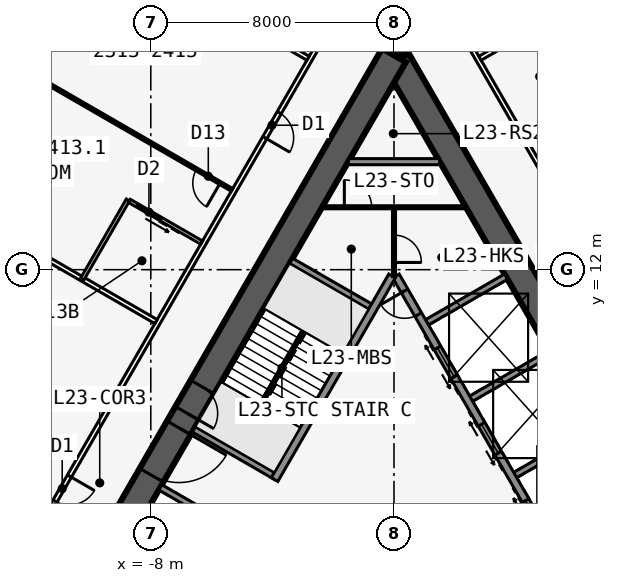
"""IFC4 building model, lengths in metres.
Left out: names, types, materials, properties, quantities, classifications, styles, units other than length and angle.
Written with IfcOpenShell. Run it as: python <this file> out.ifc"""

import sys

from ifc_helpers import new_model, si_unit, direction, frame, frame_2d, origin, place, context, subcontext, project, spatial, rectangle, extrude, element, fill, save


model = new_model("IFC4")
c1 = context("Model", 3, precision=1e-05, world=origin(), true_north=direction((0.0, 1.0)))
c2 = subcontext(c1, "Body", "Model", "MODEL_VIEW")
j1 = project(units=[si_unit("LENGTHUNIT", "METRE"), si_unit("PLANEANGLEUNIT", "RADIAN")], contexts=[c1])
p1 = place(None, origin())
s1 = spatial("IfcSite", under=j1, at=p1, CompositionType="ELEMENT")
p2 = place(p1, origin())
s2 = spatial("IfcBuilding", under=s1, at=p2, CompositionType="ELEMENT")
p3 = place(p2, frame((0.0, 0.0, 89.7)))
s3 = spatial("IfcBuildingStorey", under=s2, at=p3, CompositionType="ELEMENT", Elevation=89.7)
p4 = place(p3, frame((16.5, -9.526, 0.0), z_axis=(0.0, 0.0, 1.0), x_axis=(-0.499999749417, 0.866025548458, 0.0)))
e1 = element("IfcWall", 1, at=p4, inside=s3, PredefinedType="SHEAR", context=c2, shape_type="SweptSolid", body=[
    extrude(rectangle(XDim=33.0, YDim=0.9, at=frame_2d((16.5, 0.0))), origin(), (0.0, 0.0, 1.0), 3.4),
])
p5 = place(p4, frame((14.15, 0.0, 0.0)))
e2 = element("IfcOpeningElement", 2, at=p5, cuts=e1, PredefinedType="OPENING", context=c2, shape_type="SweptSolid", body=[
    extrude(rectangle(XDim=1.8, YDim=2.13, at=frame_2d((0.9, 1.065))), frame((0.0, 0.46, 0.0), z_axis=(0.0, -1.0, 0.0), x_axis=(1.0, 0.0, 0.0)), (0.0, 0.0, 1.0), 0.92),
])
p6 = place(p4, frame((12.6, 0.0, 0.0)))
e3 = element("IfcOpeningElement", 3, at=p6, cuts=e1, PredefinedType="OPENING", context=c2, shape_type="SweptSolid", body=[
    extrude(rectangle(XDim=1.0, YDim=2.13, at=frame_2d((0.5, 1.065))), frame((0.0, 0.46, 0.0), z_axis=(0.0, -1.0, 0.0), x_axis=(1.0, 0.0, 0.0)), (0.0, 0.0, 1.0), 0.92),
])
p7 = place(p3, frame((5.379, 2.586, 0.0), z_axis=(0.0, 0.0, 1.0), x_axis=(-0.500001375892, 0.866024609411, 0.0)))
e4 = element("IfcWall", 4, at=p7, inside=s3, PredefinedType="SOLIDWALL", context=c2, shape_type="SweptSolid", body=[
    extrude(rectangle(XDim=10.633, YDim=0.25, at=frame_2d((5.316, 0.0))), origin(), (0.0, 0.0, 1.0), 3.235),
])
p8 = place(p7, frame((9.164, 0.0, 0.0)))
e5 = element("IfcOpeningElement", 5, at=p8, cuts=e4, PredefinedType="OPENING", context=c2, shape_type="SweptSolid", body=[
    extrude(rectangle(XDim=0.9, YDim=2.13, at=frame_2d((0.45, 1.065))), frame((0.0, 0.135, 0.0), z_axis=(0.0, -1.0, 0.0), x_axis=(1.0, 0.0, 0.0)), (0.0, 0.0, 1.0), 0.27),
])
p9 = place(p7, frame((1.0, 0.0, 0.0)))
e6 = element("IfcOpeningElement", 6, at=p9, cuts=e4, PredefinedType="OPENING", context=c2, shape_type="SweptSolid", body=[
    extrude(rectangle(XDim=1.1, YDim=2.13, at=frame_2d((0.55, 1.065))), frame((0.0, 0.135, 0.0), z_axis=(0.0, -1.0, 0.0), x_axis=(1.0, 0.0, 0.0)), (0.0, 0.0, 1.0), 0.27),
])
p10 = place(p7, frame((3.9, 0.0, 0.0)))
e7 = element("IfcOpeningElement", 7, at=p10, cuts=e4, PredefinedType="OPENING", context=c2, shape_type="SweptSolid", body=[
    extrude(rectangle(XDim=1.1, YDim=2.13, at=frame_2d((0.55, 1.065))), frame((0.0, 0.135, 0.0), z_axis=(0.0, -1.0, 0.0), x_axis=(1.0, 0.0, 0.0)), (0.0, 0.0, 1.0), 0.27),
])
p11 = place(p7, frame((6.8, 0.0, 0.0)))
e8 = element("IfcOpeningElement", 8, at=p11, cuts=e4, PredefinedType="OPENING", context=c2, shape_type="SweptSolid", body=[
    extrude(rectangle(XDim=1.1, YDim=2.13, at=frame_2d((0.55, 1.065))), frame((0.0, 0.135, 0.0), z_axis=(0.0, -1.0, 0.0), x_axis=(1.0, 0.0, 0.0)), (0.0, 0.0, 1.0), 0.27),
])
for number, where, z_axis, x_axis in (
    (9, (3.879, 5.184, 0.0), (0.0, 0.0, 1.0), (0.866, 0.5, 0.0)),
    (10, (2.429, 7.696, 0.0), (0.0, 0.0, 1.0), (0.866, 0.5, 0.0)),
    (11, (0.979, 10.207, 0.0), (0.0, 0.0, 1.0), (0.866, 0.5, 0.0)),
):
    element("IfcWall", number, at=place(p3, frame(where, z_axis=z_axis, x_axis=x_axis)), inside=s3, PredefinedType="SOLIDWALL", context=c2, shape_type="SweptSolid", body=[
        extrude(rectangle(XDim=3.125, YDim=0.2, at=frame_2d((1.562, 0.0))), origin(), (0.0, 0.0, 1.0), 3.235),
    ])
p12 = place(p3, frame((0.0, 19.052, 0.0), z_axis=(0.0, 0.0, 1.0), x_axis=(-0.499999749417, -0.866025548458, 0.0)))
e12 = element("IfcWall", 12, at=p12, inside=s3, PredefinedType="SHEAR", context=c2, shape_type="SweptSolid", body=[
    extrude(rectangle(XDim=33.0, YDim=0.9, at=frame_2d((16.5, 0.0))), origin(), (0.0, 0.0, 1.0), 3.4),
])
p13 = place(p12, frame((14.15, 0.0, 0.0)))
e13 = element("IfcOpeningElement", 13, at=p13, cuts=e12, PredefinedType="OPENING", context=c2, shape_type="SweptSolid", body=[
    extrude(rectangle(XDim=1.8, YDim=2.13, at=frame_2d((0.9, 1.065))), frame((0.0, 0.46, 0.0), z_axis=(0.0, -1.0, 0.0), x_axis=(1.0, 0.0, 0.0)), (0.0, 0.0, 1.0), 0.92),
])
p14 = place(p12, frame((12.6, 0.0, 0.0)))
e14 = element("IfcOpeningElement", 14, at=p14, cuts=e12, PredefinedType="OPENING", context=c2, shape_type="SweptSolid", body=[
    extrude(rectangle(XDim=1.0, YDim=2.13, at=frame_2d((0.5, 1.065))), frame((0.0, 0.46, 0.0), z_axis=(0.0, -1.0, 0.0), x_axis=(1.0, 0.0, 0.0)), (0.0, 0.0, 1.0), 0.92),
])
p15 = place(p3, frame((-0.062, 11.794, 0.0), z_axis=(0.0, 0.0, 1.0), x_axis=(-0.500006680225, -0.86602154692, 0.0)))
e15 = element("IfcWall", 15, at=p15, inside=s3, PredefinedType="SOLIDWALL", context=c2, shape_type="SweptSolid", body=[
    extrude(rectangle(XDim=7.733, YDim=0.25, at=frame_2d((3.866, 0.0))), origin(), (0.0, 0.0, 1.0), 3.235),
])
for number, where, z_axis, x_axis in (
    (16, (-0.679, 10.727, 0.0), (0.0, 0.0, 1.0), (-0.866, 0.5, 0.0)),
    (17, (-3.879, 5.184, 0.0), (0.0, 0.0, 1.0), (-0.866, 0.5, 0.0)),
    (18, (-4.979, 3.279, 0.0), (0.0, 0.0, 1.0), (-0.866, 0.5, 0.0)),
):
    element("IfcWall", number, at=place(p3, frame(where, z_axis=z_axis, x_axis=x_axis)), inside=s3, PredefinedType="SOLIDWALL", context=c2, shape_type="SweptSolid", body=[
        extrude(rectangle(XDim=3.125, YDim=0.2, at=frame_2d((1.562, 0.0))), origin(), (0.0, 0.0, 1.0), 3.235),
    ])
p16 = place(p3, frame((0.0, 19.052, 0.0), z_axis=(0.0, 0.0, 1.0), x_axis=(0.0, 1.0, 0.0)))
e19 = element("IfcWall", 19, at=p16, inside=s3, PredefinedType="SHEAR", context=c2, shape_type="SweptSolid", body=[
    extrude(rectangle(XDim=4.746, YDim=0.9, at=frame_2d((2.373, 0.0))), origin(), (0.0, 0.0, 1.0), 3.4),
])
p17 = place(p16, frame((1.8, 0.0, 0.0)))
e20 = element("IfcOpeningElement", 20, at=p17, cuts=e19, PredefinedType="OPENING", context=c2, shape_type="SweptSolid", body=[
    extrude(rectangle(XDim=1.8, YDim=2.13, at=frame_2d((0.9, 1.065))), frame((0.0, 0.46, 0.0), z_axis=(0.0, -1.0, 0.0), x_axis=(1.0, 0.0, 0.0)), (0.0, 0.0, 1.0), 0.92),
])
p18 = place(p3, frame((20.027, -10.985, 0.0), z_axis=(0.0, 0.0, 1.0), x_axis=(-0.500001677587, 0.866024435227, 0.0)))
e21 = element("IfcWall", 21, at=p18, inside=s3, PredefinedType="PARTITIONING", context=c2, shape_type="SweptSolid", body=[
    extrude(rectangle(XDim=39.054, YDim=0.15, at=frame_2d((19.527, 0.0))), origin(), (0.0, 0.0, 1.0), 3.235),
])
p19 = place(p18, frame((0.352, 0.0, 0.0)))
e22 = element("IfcOpeningElement", 22, at=p19, cuts=e21, PredefinedType="OPENING", context=c2, shape_type="SweptSolid", body=[
    extrude(rectangle(XDim=0.95, YDim=2.13, at=frame_2d((0.475, 1.065))), frame((0.0, 0.085, 0.0), z_axis=(0.0, -1.0, 0.0), x_axis=(1.0, 0.0, 0.0)), (0.0, 0.0, 1.0), 0.17),
])
p20 = place(p18, frame((10.352, 0.0, 0.0)))
e23 = element("IfcOpeningElement", 23, at=p20, cuts=e21, PredefinedType="OPENING", context=c2, shape_type="SweptSolid", body=[
    extrude(rectangle(XDim=0.95, YDim=2.13, at=frame_2d((0.475, 1.065))), frame((0.0, 0.085, 0.0), z_axis=(0.0, -1.0, 0.0), x_axis=(1.0, 0.0, 0.0)), (0.0, 0.0, 1.0), 0.17),
])
p21 = place(p18, frame((17.752, 0.0, 0.0)))
e24 = element("IfcOpeningElement", 24, at=p21, cuts=e21, PredefinedType="OPENING", context=c2, shape_type="SweptSolid", body=[
    extrude(rectangle(XDim=0.95, YDim=2.13, at=frame_2d((0.475, 1.065))), frame((0.0, 0.085, 0.0), z_axis=(0.0, -1.0, 0.0), x_axis=(1.0, 0.0, 0.0)), (0.0, 0.0, 1.0), 0.17),
])
p22 = place(p18, frame((26.552, 0.0, 0.0)))
e25 = element("IfcOpeningElement", 25, at=p22, cuts=e21, PredefinedType="OPENING", context=c2, shape_type="SweptSolid", body=[
    extrude(rectangle(XDim=0.95, YDim=2.13, at=frame_2d((0.475, 1.065))), frame((0.0, 0.085, 0.0), z_axis=(0.0, -1.0, 0.0), x_axis=(1.0, 0.0, 0.0)), (0.0, 0.0, 1.0), 0.17),
])
p23 = place(p18, frame((37.752, 0.0, 0.0)))
e26 = element("IfcOpeningElement", 26, at=p23, cuts=e21, PredefinedType="OPENING", context=c2, shape_type="SweptSolid", body=[
    extrude(rectangle(XDim=0.95, YDim=2.13, at=frame_2d((0.475, 1.065))), frame((0.0, 0.085, 0.0), z_axis=(0.0, -1.0, 0.0), x_axis=(1.0, 0.0, 0.0)), (0.0, 0.0, 1.0), 0.17),
])
p24 = place(p3, frame((2.829, 18.954, 0.0), z_axis=(0.0, 0.0, 1.0), x_axis=(0.866020536561, 0.500008430184, 0.0)))
e27 = element("IfcWall", 27, at=p24, inside=s3, PredefinedType="PARTITIONING", context=c2, shape_type="SweptSolid", body=[
    extrude(rectangle(XDim=8.72, YDim=0.15, at=frame_2d((4.36, 0.0))), origin(), (0.0, 0.0, 1.0), 2.389),
])
p25 = place(p3, frame((4.329, 16.355, 0.0), z_axis=(0.0, 0.0, 1.0), x_axis=(0.866035715982, 0.499982138324, 0.0)))
e28 = element("IfcWall", 28, at=p25, inside=s3, PredefinedType="PLUMBINGWALL", context=c2, shape_type="SweptSolid", body=[
    extrude(rectangle(XDim=2.74, YDim=0.12, at=frame_2d((1.37, 0.0))), origin(), (0.0, 0.0, 1.0), 3.235),
])
p26 = place(p25, frame((1.55, 0.0, 0.0)))
e29 = element("IfcOpeningElement", 29, at=p26, cuts=e28, PredefinedType="OPENING", context=c2, shape_type="SweptSolid", body=[
    extrude(rectangle(XDim=0.9, YDim=2.13, at=frame_2d((0.45, 1.065))), frame((0.0, 0.07, 0.0), z_axis=(0.0, -1.0, 0.0), x_axis=(1.0, 0.0, 0.0)), (0.0, 0.0, 1.0), 0.14),
])
p27 = place(p3, frame((-0.5, 22.836, 0.0), z_axis=(0.0, 0.0, 1.0), x_axis=(-0.500001677587, -0.866024435227, 0.0)))
e30 = element("IfcWall", 30, at=p27, inside=s3, PredefinedType="PARTITIONING", context=c2, shape_type="SweptSolid", body=[
    extrude(rectangle(XDim=39.054, YDim=0.15, at=frame_2d((19.527, 0.0))), origin(), (0.0, 0.0, 1.0), 3.235),
])
p28 = place(p27, frame((0.352, 0.0, 0.0)))
e31 = element("IfcOpeningElement", 31, at=p28, cuts=e30, PredefinedType="OPENING", context=c2, shape_type="SweptSolid", body=[
    extrude(rectangle(XDim=0.95, YDim=2.13, at=frame_2d((0.475, 1.065))), frame((0.0, 0.085, 0.0), z_axis=(0.0, -1.0, 0.0), x_axis=(1.0, 0.0, 0.0)), (0.0, 0.0, 1.0), 0.17),
])
p29 = place(p27, frame((6.552, 0.0, 0.0)))
e32 = element("IfcOpeningElement", 32, at=p29, cuts=e30, PredefinedType="OPENING", context=c2, shape_type="SweptSolid", body=[
    extrude(rectangle(XDim=0.95, YDim=2.13, at=frame_2d((0.475, 1.065))), frame((0.0, 0.085, 0.0), z_axis=(0.0, -1.0, 0.0), x_axis=(1.0, 0.0, 0.0)), (0.0, 0.0, 1.0), 0.17),
])
p30 = place(p27, frame((20.352, 0.0, 0.0)))
e33 = element("IfcOpeningElement", 33, at=p30, cuts=e30, PredefinedType="OPENING", context=c2, shape_type="SweptSolid", body=[
    extrude(rectangle(XDim=0.95, YDim=2.13, at=frame_2d((0.475, 1.065))), frame((0.0, 0.085, 0.0), z_axis=(0.0, -1.0, 0.0), x_axis=(1.0, 0.0, 0.0)), (0.0, 0.0, 1.0), 0.17),
])
p31 = place(p27, frame((27.752, 0.0, 0.0)))
e34 = element("IfcOpeningElement", 34, at=p31, cuts=e30, PredefinedType="OPENING", context=c2, shape_type="SweptSolid", body=[
    extrude(rectangle(XDim=0.95, YDim=2.13, at=frame_2d((0.475, 1.065))), frame((0.0, 0.085, 0.0), z_axis=(0.0, -1.0, 0.0), x_axis=(1.0, 0.0, 0.0)), (0.0, 0.0, 1.0), 0.17),
])
p32 = place(p27, frame((37.752, 0.0, 0.0)))
e35 = element("IfcOpeningElement", 35, at=p32, cuts=e30, PredefinedType="OPENING", context=c2, shape_type="SweptSolid", body=[
    extrude(rectangle(XDim=0.95, YDim=2.13, at=frame_2d((0.475, 1.065))), frame((0.0, 0.085, 0.0), z_axis=(0.0, -1.0, 0.0), x_axis=(1.0, 0.0, 0.0)), (0.0, 0.0, 1.0), 0.17),
])
p33 = place(p3, frame((-2.829, 18.954, 0.0), z_axis=(0.0, 0.0, 1.0), x_axis=(-0.866020536561, 0.500008430184, 0.0)))
e36 = element("IfcWall", 36, at=p33, inside=s3, PredefinedType="PARTITIONING", context=c2, shape_type="SweptSolid", body=[
    extrude(rectangle(XDim=8.72, YDim=0.15, at=frame_2d((4.36, 0.0))), origin(), (0.0, 0.0, 1.0), 2.389),
])
p34 = place(p3, frame((-5.329, 14.623, 0.0), z_axis=(0.0, 0.0, 1.0), x_axis=(-0.866018409083, 0.500012114982, 0.0)))
e37 = element("IfcWall", 37, at=p34, inside=s3, PredefinedType="PARTITIONING", context=c2, shape_type="SweptSolid", body=[
    extrude(rectangle(XDim=9.485, YDim=0.1, at=frame_2d((4.742, 0.0))), origin(), (0.0, 0.0, 1.0), 2.389),
])
p35 = place(p34, frame((0.45, 0.0, 0.0)))
e38 = element("IfcOpeningElement", 38, at=p35, cuts=e37, PredefinedType="OPENING", context=c2, shape_type="SweptSolid", body=[
    extrude(rectangle(XDim=0.9, YDim=2.13, at=frame_2d((0.45, 1.065))), frame((0.0, 0.06, 0.0), z_axis=(0.0, -1.0, 0.0), x_axis=(1.0, 0.0, 0.0)), (0.0, 0.0, 1.0), 0.12),
])
p36 = place(p3, frame((-7.829, 10.293, 0.0), z_axis=(0.0, 0.0, 1.0), x_axis=(-0.866016302457, 0.50001576363, 0.0)))
e39 = element("IfcWall", 39, at=p36, inside=s3, PredefinedType="PARTITIONING", context=c2, shape_type="SweptSolid", body=[
    extrude(rectangle(XDim=9.943, YDim=0.15, at=frame_2d((4.972, 0.0))), origin(), (0.0, 0.0, 1.0), 2.389),
])
p37 = place(p3, frame((-8.753, 14.291, 0.0), z_axis=(0.0, 0.0, 1.0), x_axis=(-0.50002537861, -0.866010750942, 0.0)))
e40 = element("IfcWall", 40, at=p37, inside=s3, PredefinedType="PLUMBINGWALL", context=c2, shape_type="SweptSolid", body=[
    extrude(rectangle(XDim=3.0, YDim=0.12, at=frame_2d((1.5, 0.0))), origin(), (0.0, 0.0, 1.0), 3.235),
])
p38 = place(p3, frame((-6.329, 12.891, 0.0), z_axis=(0.0, 0.0, 1.0), x_axis=(-0.866035715982, 0.499982138324, 0.0)))
e41 = element("IfcWall", 41, at=p38, inside=s3, PredefinedType="PLUMBINGWALL", context=c2, shape_type="SweptSolid", body=[
    extrude(rectangle(XDim=2.74, YDim=0.12, at=frame_2d((1.37, 0.0))), origin(), (0.0, 0.0, 1.0), 3.235),
])
p39 = place(p38, frame((1.55, 0.0, 0.0)))
e42 = element("IfcOpeningElement", 42, at=p39, cuts=e41, PredefinedType="OPENING", context=c2, shape_type="SweptSolid", body=[
    extrude(rectangle(XDim=0.9, YDim=2.13, at=frame_2d((0.45, 1.065))), frame((0.0, 0.07, 0.0), z_axis=(0.0, -1.0, 0.0), x_axis=(1.0, 0.0, 0.0)), (0.0, 0.0, 1.0), 0.14),
])
p40 = place(p3, frame((-1.501, 15.552, 0.0), z_axis=(0.0, 0.0, 1.0), x_axis=(1.0, 0.0, 0.0)))
e43 = element("IfcWall", 43, at=p40, inside=s3, PredefinedType="SOLIDWALL", context=c2, shape_type="SweptSolid", body=[
    extrude(rectangle(XDim=3.002, YDim=0.2, at=frame_2d((1.501, 0.0))), origin(), (0.0, 0.0, 1.0), 3.235),
])
p41 = place(p3, frame((-2.367, 14.052, 0.0), z_axis=(0.0, 0.0, 1.0), x_axis=(1.0, 0.0, 0.0)))
e44 = element("IfcWall", 44, at=p41, inside=s3, PredefinedType="PARTITIONING", context=c2, shape_type="SweptSolid", body=[
    extrude(rectangle(XDim=4.734, YDim=0.1, at=frame_2d((2.367, 0.0))), origin(), (0.0, 0.0, 1.0), 3.235),
])
p42 = place(p41, frame((0.734, 0.0, 0.0)))
e45 = element("IfcOpeningElement", 45, at=p42, cuts=e44, PredefinedType="OPENING", context=c2, shape_type="SweptSolid", body=[
    extrude(rectangle(XDim=0.9, YDim=2.13, at=frame_2d((0.45, 1.065))), frame((0.0, 0.06, 0.0), z_axis=(0.0, -1.0, 0.0), x_axis=(1.0, 0.0, 0.0)), (0.0, 0.0, 1.0), 0.12),
])
p43 = place(p3, frame((0.0, 14.052, 0.0), z_axis=(0.0, 0.0, 1.0), x_axis=(0.0, -1.0, 0.0)))
e46 = element("IfcWall", 46, at=p43, inside=s3, PredefinedType="PARTITIONING", context=c2, shape_type="SweptSolid", body=[
    extrude(rectangle(XDim=2.275, YDim=0.1, at=frame_2d((1.138, 0.0))), origin(), (0.0, 0.0, 1.0), 3.235),
])
p44 = place(p43, frame((0.915, 0.0, 0.0)))
e47 = element("IfcOpeningElement", 47, at=p44, cuts=e46, PredefinedType="OPENING", context=c2, shape_type="SweptSolid", body=[
    extrude(rectangle(XDim=0.9, YDim=2.13, at=frame_2d((0.45, 1.065))), frame((0.0, 0.06, 0.0), z_axis=(0.0, -1.0, 0.0), x_axis=(1.0, 0.0, 0.0)), (0.0, 0.0, 1.0), 0.12),
])
p45 = place(p3, frame((-2.988, 9.978, 0.0), z_axis=(0.0, 0.0, 1.0), x_axis=(-0.499992232847, -0.866029888106, 0.0)))
e48 = element("IfcWall", 48, at=p45, inside=s3, PredefinedType="SOLIDWALL", context=c2, shape_type="SweptSolid", body=[
    extrude(rectangle(XDim=2.794, YDim=0.1, at=frame_2d((1.397, 0.0))), origin(), (0.0, 0.0, 1.0), 3.4),
])
p46 = place(p35, origin())
e49 = element("IfcDoor", 49, at=p46, inside=s3, OperationType="SINGLE_SWING_LEFT", PredefinedType="DOOR", context=c2, shape_type="SweptSolid", body=[
    extrude(rectangle(XDim=0.9, YDim=2.13, at=frame_2d((0.45, 1.065))), frame((0.0, 0.025, 0.0), z_axis=(0.0, -1.0, 0.0), x_axis=(1.0, 0.0, 0.0)), (0.0, 0.0, 1.0), 0.05),
])
fill(e38, e49)
p47 = place(p29, origin())
e50 = element("IfcDoor", 50, at=p47, inside=s3, OperationType="SINGLE_SWING_RIGHT", PredefinedType="DOOR", context=c2, shape_type="SweptSolid", body=[
    extrude(rectangle(XDim=0.95, YDim=2.13, at=frame_2d((0.475, 1.065))), frame((0.0, 0.025, 0.0), z_axis=(0.0, -1.0, 0.0), x_axis=(1.0, 0.0, 0.0)), (0.0, 0.0, 1.0), 0.05),
])
fill(e32, e50)
p48 = place(p39, origin())
e51 = element("IfcDoor", 51, at=p48, inside=s3, OperationType="SLIDING_TO_LEFT", PredefinedType="DOOR", context=c2, shape_type="SweptSolid", body=[
    extrude(rectangle(XDim=0.9, YDim=2.13, at=frame_2d((0.45, 1.065))), frame((0.0, 0.025, 0.0), z_axis=(0.0, -1.0, 0.0), x_axis=(1.0, 0.0, 0.0)), (0.0, 0.0, 1.0), 0.05),
])
fill(e42, e51)
p49 = place(p30, origin())
e52 = element("IfcDoor", 52, at=p49, inside=s3, OperationType="SINGLE_SWING_LEFT", PredefinedType="DOOR", context=c2, shape_type="SweptSolid", body=[
    extrude(rectangle(XDim=0.95, YDim=2.13, at=frame_2d((0.475, 1.065))), frame((0.0, 0.025, 0.0), z_axis=(0.0, -1.0, 0.0), x_axis=(1.0, 0.0, 0.0)), (0.0, 0.0, 1.0), 0.05),
])
fill(e33, e52)
p50 = place(p13, origin())
e53 = element("IfcDoor", 53, at=p50, inside=s3, OperationType="DOUBLE_DOOR_SINGLE_SWING", PredefinedType="DOOR", context=c2, shape_type="SweptSolid", body=[
    extrude(rectangle(XDim=1.8, YDim=2.13, at=frame_2d((0.9, 1.065))), frame((0.0, 0.025, 0.0), z_axis=(0.0, -1.0, 0.0), x_axis=(1.0, 0.0, 0.0)), (0.0, 0.0, 1.0), 0.05),
])
fill(e13, e53)
p51 = place(p14, origin())
e54 = element("IfcDoor", 54, at=p51, inside=s3, OperationType="SINGLE_SWING_RIGHT", PredefinedType="DOOR", context=c2, shape_type="SweptSolid", body=[
    extrude(rectangle(XDim=1.0, YDim=2.13, at=frame_2d((0.5, 1.065))), frame((0.0, 0.025, 0.0), z_axis=(0.0, -1.0, 0.0), x_axis=(1.0, 0.0, 0.0)), (0.0, 0.0, 1.0), 0.05),
])
fill(e14, e54)
p52 = place(p42, origin())
e55 = element("IfcDoor", 55, at=p52, inside=s3, OperationType="SINGLE_SWING_LEFT", PredefinedType="DOOR", context=c2, shape_type="SweptSolid", body=[
    extrude(rectangle(XDim=0.9, YDim=2.13, at=frame_2d((0.45, 1.065))), frame((0.0, 0.025, 0.0), z_axis=(0.0, -1.0, 0.0), x_axis=(1.0, 0.0, 0.0)), (0.0, 0.0, 1.0), 0.05),
])
fill(e45, e55)
p53 = place(p8, origin())
e56 = element("IfcDoor", 56, at=p53, inside=s3, OperationType="SINGLE_SWING_RIGHT", PredefinedType="DOOR", context=c2, shape_type="SweptSolid", body=[
    extrude(rectangle(XDim=0.9, YDim=2.13, at=frame_2d((0.45, 1.065))), frame((0.0, 0.025, 0.0), z_axis=(0.0, -1.0, 0.0), x_axis=(1.0, 0.0, 0.0)), (0.0, 0.0, 1.0), 0.05),
])
fill(e5, e56)
p54 = place(p44, origin())
e57 = element("IfcDoor", 57, at=p54, inside=s3, OperationType="SINGLE_SWING_RIGHT", PredefinedType="DOOR", context=c2, shape_type="SweptSolid", body=[
    extrude(rectangle(XDim=0.9, YDim=2.13, at=frame_2d((0.45, 1.065))), frame((0.0, 0.025, 0.0), z_axis=(0.0, -1.0, 0.0), x_axis=(1.0, 0.0, 0.0)), (0.0, 0.0, 1.0), 0.05),
])
fill(e47, e57)
p55 = place(p9, origin())
e58 = element("IfcDoor", 58, at=p55, inside=s3, OperationType="DOUBLE_DOOR_SLIDING", PredefinedType="USERDEFINED", context=c2, shape_type="SweptSolid", body=[
    extrude(rectangle(XDim=1.1, YDim=2.13, at=frame_2d((0.55, 1.065))), frame((0.0, 0.025, 0.0), z_axis=(0.0, -1.0, 0.0), x_axis=(1.0, 0.0, 0.0)), (0.0, 0.0, 1.0), 0.05),
])
fill(e6, e58)
p56 = place(p10, origin())
e59 = element("IfcDoor", 59, at=p56, inside=s3, OperationType="DOUBLE_DOOR_SLIDING", PredefinedType="USERDEFINED", context=c2, shape_type="SweptSolid", body=[
    extrude(rectangle(XDim=1.1, YDim=2.13, at=frame_2d((0.55, 1.065))), frame((0.0, 0.025, 0.0), z_axis=(0.0, -1.0, 0.0), x_axis=(1.0, 0.0, 0.0)), (0.0, 0.0, 1.0), 0.05),
])
fill(e7, e59)
p57 = place(p11, origin())
e60 = element("IfcDoor", 60, at=p57, inside=s3, OperationType="DOUBLE_DOOR_SLIDING", PredefinedType="USERDEFINED", context=c2, shape_type="SweptSolid", body=[
    extrude(rectangle(XDim=1.1, YDim=2.13, at=frame_2d((0.55, 1.065))), frame((0.0, 0.025, 0.0), z_axis=(0.0, -1.0, 0.0), x_axis=(1.0, 0.0, 0.0)), (0.0, 0.0, 1.0), 0.05),
])
fill(e8, e60)
save(model, sys.argv[1])
